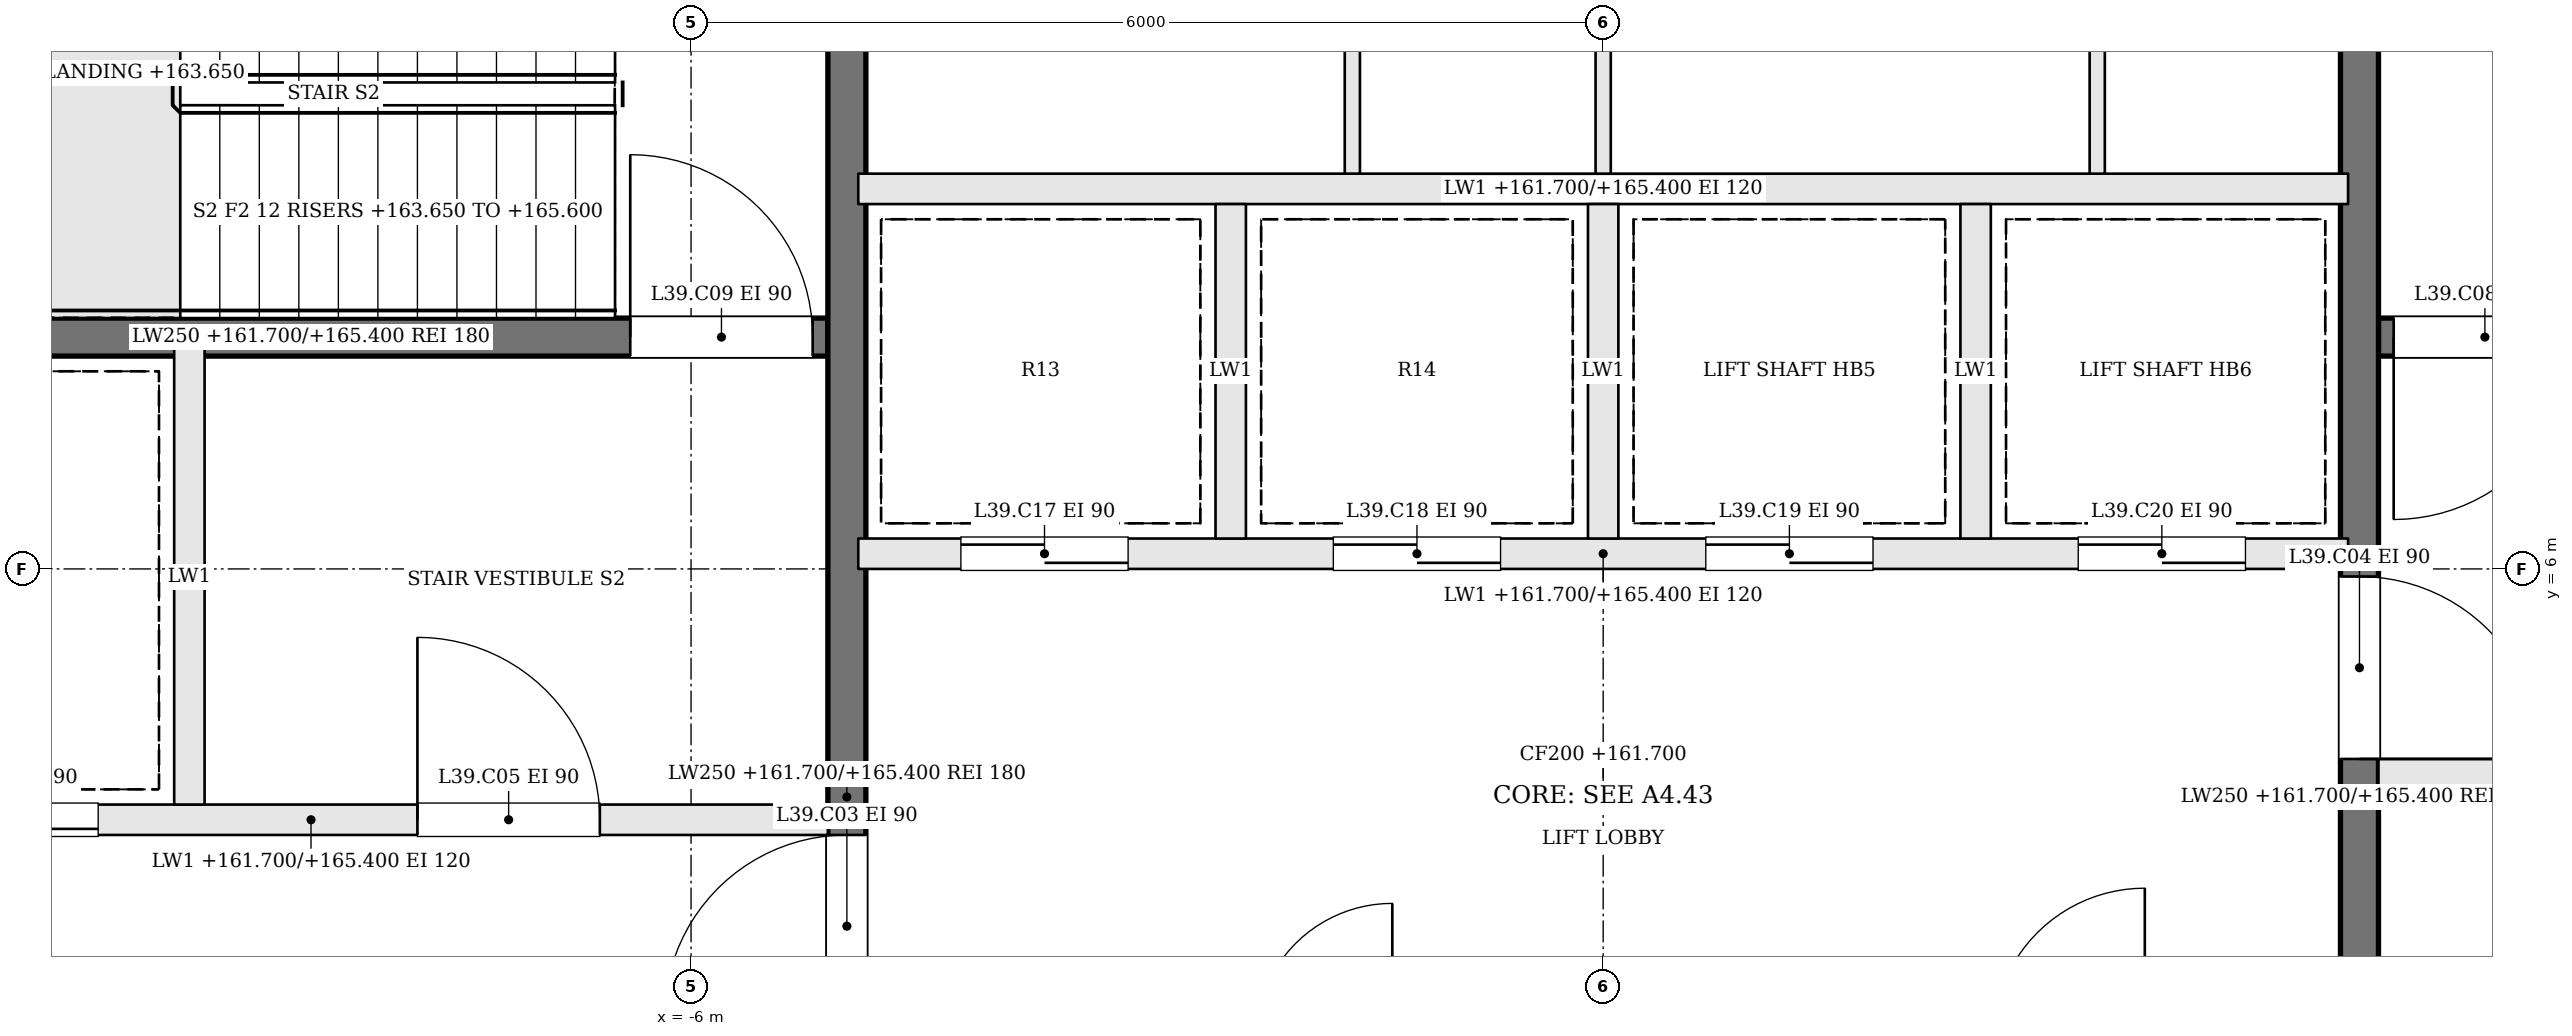
"""IFC4 building model, lengths in metres.
Left out: names, types, materials, properties, quantities, classifications, styles, units other than length and angle.
Written with IfcOpenShell. Run it as: python <this file> out.ifc"""

import sys

from ifc_helpers import new_model, si_unit, direction, frame, frame_2d, origin, place, context, subcontext, project, spatial, rectangle, extrude, element, fill, save


model = new_model("IFC4")
c1 = context("Model", 3, precision=1e-05, world=origin(), true_north=direction((0.0, 1.0)))
c2 = subcontext(c1, "Body", "Model", "MODEL_VIEW")
j1 = project(units=[si_unit("LENGTHUNIT", "METRE"), si_unit("PLANEANGLEUNIT", "RADIAN")], contexts=[c1])
p1 = place(None, origin())
s1 = spatial("IfcSite", under=j1, at=p1, CompositionType="ELEMENT")
p2 = place(p1, origin())
s2 = spatial("IfcBuilding", under=s1, at=p2, CompositionType="ELEMENT")
p3 = place(p2, frame((0.0, 0.0, 161.7)))
s3 = spatial("IfcBuildingStorey", under=s2, at=p3, CompositionType="ELEMENT", Elevation=161.7)
p4 = place(p3, frame((11.9, 7.525, 0.0), z_axis=(0.0, 0.0, 1.0), x_axis=(-1.0, 0.0, 0.0)))
e1 = element("IfcWall", 1, at=p4, inside=s3, PredefinedType="SOLIDWALL", context=c2, shape_type="SweptSolid", body=[
    extrude(rectangle(XDim=6.8, YDim=0.25, at=frame_2d((3.4, 0.0))), origin(), (0.0, 0.0, 1.0), 3.7),
])
p5 = place(p4, frame((5.5, 0.0, 0.0)))
e2 = element("IfcOpeningElement", 2, at=p5, cuts=e1, PredefinedType="OPENING", context=c2, shape_type="SweptSolid", body=[
    extrude(rectangle(XDim=1.2, YDim=2.1, at=frame_2d((0.6, 1.05))), frame((0.0, 0.135, 0.0), z_axis=(0.0, -1.0, 0.0), x_axis=(1.0, 0.0, 0.0)), (0.0, 0.0, 1.0), 0.27),
])
p6 = place(p3, frame((-11.9, 4.35, 0.0), z_axis=(0.0, 0.0, 1.0), x_axis=(1.0, 0.0, 0.0)))
e3 = element("IfcWall", 3, at=p6, inside=s3, PredefinedType="SOLIDWALL", context=c2, shape_type="SweptSolid", body=[
    extrude(rectangle(XDim=6.8, YDim=0.2, at=frame_2d((3.4, 0.0))), origin(), (0.0, 0.0, 1.0), 3.7),
])
p7 = place(p6, frame((4.1, 0.0, 0.0)))
e4 = element("IfcOpeningElement", 4, at=p7, cuts=e3, PredefinedType="OPENING", context=c2, shape_type="SweptSolid", body=[
    extrude(rectangle(XDim=1.2, YDim=2.1, at=frame_2d((0.6, 1.05))), frame((0.0, 0.11, 0.0), z_axis=(0.0, -1.0, 0.0), x_axis=(1.0, 0.0, 0.0)), (0.0, 0.0, 1.0), 0.22),
])
p8 = place(p6, frame((0.8, 0.0, 0.0)))
e5 = element("IfcOpeningElement", 5, at=p8, cuts=e3, PredefinedType="OPENING", context=c2, shape_type="SweptSolid", body=[
    extrude(rectangle(XDim=1.2, YDim=2.1, at=frame_2d((0.6, 1.05))), frame((0.0, 0.11, 0.0), z_axis=(0.0, -1.0, 0.0), x_axis=(1.0, 0.0, 0.0)), (0.0, 0.0, 1.0), 0.22),
])
p9 = place(p3, frame((11.9, 4.65, 0.0), z_axis=(0.0, 0.0, 1.0), x_axis=(-1.0, 0.0, 0.0)))
e6 = element("IfcWall", 6, at=p9, inside=s3, PredefinedType="SOLIDWALL", context=c2, shape_type="SweptSolid", body=[
    extrude(rectangle(XDim=6.8, YDim=0.2, at=frame_2d((3.4, 0.0))), origin(), (0.0, 0.0, 1.0), 3.7),
])
p10 = place(p9, frame((4.1, 0.0, 0.0)))
e7 = element("IfcOpeningElement", 7, at=p10, cuts=e6, PredefinedType="OPENING", context=c2, shape_type="SweptSolid", body=[
    extrude(rectangle(XDim=1.2, YDim=2.1, at=frame_2d((0.6, 1.05))), frame((0.0, 0.11, 0.0), z_axis=(0.0, -1.0, 0.0), x_axis=(1.0, 0.0, 0.0)), (0.0, 0.0, 1.0), 0.22),
])
p11 = place(p9, frame((0.8, 0.0, 0.0)))
e8 = element("IfcOpeningElement", 8, at=p11, cuts=e6, PredefinedType="OPENING", context=c2, shape_type="SweptSolid", body=[
    extrude(rectangle(XDim=1.2, YDim=2.1, at=frame_2d((0.6, 1.05))), frame((0.0, 0.11, 0.0), z_axis=(0.0, -1.0, 0.0), x_axis=(1.0, 0.0, 0.0)), (0.0, 0.0, 1.0), 0.22),
])
p12 = place(p3, frame((-11.9, 7.525, 0.0), z_axis=(0.0, 0.0, 1.0), x_axis=(1.0, 0.0, 0.0)))
e9 = element("IfcWall", 9, at=p12, inside=s3, PredefinedType="SOLIDWALL", context=c2, shape_type="SweptSolid", body=[
    extrude(rectangle(XDim=6.8, YDim=0.25, at=frame_2d((3.4, 0.0))), origin(), (0.0, 0.0, 1.0), 3.7),
])
p13 = place(p12, frame((5.5, 0.0, 0.0)))
e10 = element("IfcOpeningElement", 10, at=p13, cuts=e9, PredefinedType="OPENING", context=c2, shape_type="SweptSolid", body=[
    extrude(rectangle(XDim=1.2, YDim=2.1, at=frame_2d((0.6, 1.05))), frame((0.0, 0.135, 0.0), z_axis=(0.0, -1.0, 0.0), x_axis=(1.0, 0.0, 0.0)), (0.0, 0.0, 1.0), 0.27),
])
p14 = place(p3, frame((-9.3, 4.45, 0.0), z_axis=(0.0, 0.0, 1.0), x_axis=(0.0, 1.0, 0.0)))
e11 = element("IfcWall", 11, at=p14, inside=s3, PredefinedType="SOLIDWALL", context=c2, shape_type="SweptSolid", body=[
    extrude(rectangle(XDim=3.0, YDim=0.2, at=frame_2d((1.5, 0.0))), origin(), (0.0, 0.0, 1.0), 3.7),
])
p15 = place(p3, frame((-4.975, -1.9, 0.0), z_axis=(0.0, 0.0, 1.0), x_axis=(0.0, 1.0, 0.0)))
e12 = element("IfcWall", 12, at=p15, inside=s3, PredefinedType="SOLIDWALL", context=c2, shape_type="SweptSolid", body=[
    extrude(rectangle(XDim=12.8, YDim=0.25, at=frame_2d((6.4, 0.0))), origin(), (0.0, 0.0, 1.0), 3.7),
])
p16 = place(p15, frame((4.95, 0.0, 0.0)))
e13 = element("IfcOpeningElement", 13, at=p16, cuts=e12, PredefinedType="OPENING", context=c2, shape_type="SweptSolid", body=[
    extrude(rectangle(XDim=1.2, YDim=2.1, at=frame_2d((0.6, 1.05))), frame((0.0, 0.135, 0.0), z_axis=(0.0, -1.0, 0.0), x_axis=(1.0, 0.0, 0.0)), (0.0, 0.0, 1.0), 0.27),
])
p17 = place(p3, frame((4.975, 10.9, 0.0), z_axis=(0.0, 0.0, 1.0), x_axis=(0.0, -1.0, 0.0)))
e14 = element("IfcWall", 14, at=p17, inside=s3, PredefinedType="SOLIDWALL", context=c2, shape_type="SweptSolid", body=[
    extrude(rectangle(XDim=12.8, YDim=0.25, at=frame_2d((6.4, 0.0))), origin(), (0.0, 0.0, 1.0), 3.7),
])
p18 = place(p17, frame((4.95, 0.0, 0.0)))
e15 = element("IfcOpeningElement", 15, at=p18, cuts=e14, PredefinedType="OPENING", context=c2, shape_type="SweptSolid", body=[
    extrude(rectangle(XDim=1.2, YDim=2.1, at=frame_2d((0.6, 1.05))), frame((0.0, 0.135, 0.0), z_axis=(0.0, -1.0, 0.0), x_axis=(1.0, 0.0, 0.0)), (0.0, 0.0, 1.0), 0.27),
])
p19 = place(p3, frame((-4.9, 6.1, 0.0), z_axis=(0.0, 0.0, 1.0), x_axis=(1.0, 0.0, 0.0)))
e16 = element("IfcWall", 16, at=p19, inside=s3, PredefinedType="SOLIDWALL", context=c2, shape_type="SweptSolid", body=[
    extrude(rectangle(XDim=9.8, YDim=0.2, at=frame_2d((4.9, 0.0))), origin(), (0.0, 0.0, 1.0), 3.7),
])
p20 = place(p19, frame((0.675, 0.0, 0.0)))
e17 = element("IfcOpeningElement", 17, at=p20, cuts=e16, PredefinedType="OPENING", context=c2, shape_type="SweptSolid", body=[
    extrude(rectangle(XDim=1.1, YDim=2.1, at=frame_2d((0.55, 1.05))), frame((0.0, 0.11, 0.0), z_axis=(0.0, -1.0, 0.0), x_axis=(1.0, 0.0, 0.0)), (0.0, 0.0, 1.0), 0.22),
])
p21 = place(p19, frame((3.125, 0.0, 0.0)))
e18 = element("IfcOpeningElement", 18, at=p21, cuts=e16, PredefinedType="OPENING", context=c2, shape_type="SweptSolid", body=[
    extrude(rectangle(XDim=1.1, YDim=2.1, at=frame_2d((0.55, 1.05))), frame((0.0, 0.11, 0.0), z_axis=(0.0, -1.0, 0.0), x_axis=(1.0, 0.0, 0.0)), (0.0, 0.0, 1.0), 0.22),
])
p22 = place(p19, frame((5.575, 0.0, 0.0)))
e19 = element("IfcOpeningElement", 19, at=p22, cuts=e16, PredefinedType="OPENING", context=c2, shape_type="SweptSolid", body=[
    extrude(rectangle(XDim=1.1, YDim=2.1, at=frame_2d((0.55, 1.05))), frame((0.0, 0.11, 0.0), z_axis=(0.0, -1.0, 0.0), x_axis=(1.0, 0.0, 0.0)), (0.0, 0.0, 1.0), 0.22),
])
p23 = place(p19, frame((8.025, 0.0, 0.0)))
e20 = element("IfcOpeningElement", 20, at=p23, cuts=e16, PredefinedType="OPENING", context=c2, shape_type="SweptSolid", body=[
    extrude(rectangle(XDim=1.1, YDim=2.1, at=frame_2d((0.55, 1.05))), frame((0.0, 0.11, 0.0), z_axis=(0.0, -1.0, 0.0), x_axis=(1.0, 0.0, 0.0)), (0.0, 0.0, 1.0), 0.22),
])
p24 = place(p3, frame((-4.9, 8.5, 0.0), z_axis=(0.0, 0.0, 1.0), x_axis=(1.0, 0.0, 0.0)))
e21 = element("IfcWall", 21, at=p24, inside=s3, PredefinedType="SOLIDWALL", context=c2, shape_type="SweptSolid", body=[
    extrude(rectangle(XDim=9.8, YDim=0.2, at=frame_2d((4.9, 0.0))), origin(), (0.0, 0.0, 1.0), 3.7),
])
for number, where, z_axis, x_axis in (
    (22, (-2.45, 6.2, 0.0), (0.0, 0.0, 1.0), (0.0, 1.0, 0.0)),
    (23, (0.0, 6.2, 0.0), (0.0, 0.0, 1.0), (0.0, 1.0, 0.0)),
    (24, (2.45, 6.2, 0.0), (0.0, 0.0, 1.0), (0.0, 1.0, 0.0)),
):
    element("IfcWall", number, at=place(p3, frame(where, z_axis=z_axis, x_axis=x_axis)), inside=s3, PredefinedType="SOLIDWALL", context=c2, shape_type="SweptSolid", body=[
        extrude(rectangle(XDim=2.2, YDim=0.2, at=frame_2d((1.1, 0.0))), origin(), (0.0, 0.0, 1.0), 3.7),
    ])
for number, where, z_axis, x_axis in (
    (25, (-1.65, 8.6, 0.0), (0.0, 0.0, 1.0), (0.0, 1.0, 0.0)),
    (26, (0.0, 8.6, 0.0), (0.0, 0.0, 1.0), (0.0, 1.0, 0.0)),
    (27, (3.25, 8.6, 0.0), (0.0, 0.0, 1.0), (0.0, 1.0, 0.0)),
):
    element("IfcWall", number, at=place(p3, frame(where, z_axis=z_axis, x_axis=x_axis)), inside=s3, PredefinedType="PARTITIONING", context=c2, shape_type="SweptSolid", body=[
        extrude(rectangle(XDim=2.3, YDim=0.1, at=frame_2d((1.15, 0.0))), origin(), (0.0, 0.0, 1.0), 3.7),
    ])
p25 = place(p16, origin())
e28 = element("IfcDoor", 28, at=p25, inside=s3, OperationType="SINGLE_SWING_LEFT", PredefinedType="DOOR", context=c2, shape_type="SweptSolid", body=[
    extrude(rectangle(XDim=1.2, YDim=2.1, at=frame_2d((0.6, 1.05))), frame((0.0, 0.025, 0.0), z_axis=(0.0, -1.0, 0.0), x_axis=(1.0, 0.0, 0.0)), (0.0, 0.0, 1.0), 0.05),
])
fill(e13, e28)
p26 = place(p18, origin())
e29 = element("IfcDoor", 29, at=p26, inside=s3, OperationType="SINGLE_SWING_RIGHT", PredefinedType="DOOR", context=c2, shape_type="SweptSolid", body=[
    extrude(rectangle(XDim=1.2, YDim=2.1, at=frame_2d((0.6, 1.05))), frame((0.0, 0.025, 0.0), z_axis=(0.0, -1.0, 0.0), x_axis=(1.0, 0.0, 0.0)), (0.0, 0.0, 1.0), 0.05),
])
fill(e15, e29)
p27 = place(p7, origin())
e30 = element("IfcDoor", 30, at=p27, inside=s3, OperationType="SINGLE_SWING_LEFT", PredefinedType="DOOR", context=c2, shape_type="SweptSolid", body=[
    extrude(rectangle(XDim=1.2, YDim=2.1, at=frame_2d((0.6, 1.05))), frame((0.0, 0.025, 0.0), z_axis=(0.0, -1.0, 0.0), x_axis=(1.0, 0.0, 0.0)), (0.0, 0.0, 1.0), 0.05),
])
fill(e4, e30)
p28 = place(p5, origin())
e31 = element("IfcDoor", 31, at=p28, inside=s3, OperationType="SINGLE_SWING_RIGHT", PredefinedType="DOOR", context=c2, shape_type="SweptSolid", body=[
    extrude(rectangle(XDim=1.2, YDim=2.1, at=frame_2d((0.6, 1.05))), frame((0.0, 0.025, 0.0), z_axis=(0.0, -1.0, 0.0), x_axis=(1.0, 0.0, 0.0)), (0.0, 0.0, 1.0), 0.05),
])
fill(e2, e31)
p29 = place(p13, origin())
e32 = element("IfcDoor", 32, at=p29, inside=s3, OperationType="SINGLE_SWING_LEFT", PredefinedType="DOOR", context=c2, shape_type="SweptSolid", body=[
    extrude(rectangle(XDim=1.2, YDim=2.1, at=frame_2d((0.6, 1.05))), frame((0.0, 0.025, 0.0), z_axis=(0.0, -1.0, 0.0), x_axis=(1.0, 0.0, 0.0)), (0.0, 0.0, 1.0), 0.05),
])
fill(e10, e32)
p30 = place(p8, origin())
e33 = element("IfcDoor", 33, at=p30, inside=s3, OperationType="SLIDING_TO_RIGHT", PredefinedType="DOOR", context=c2, shape_type="SweptSolid", body=[
    extrude(rectangle(XDim=1.2, YDim=2.1, at=frame_2d((0.6, 1.05))), frame((0.0, 0.025, 0.0), z_axis=(0.0, -1.0, 0.0), x_axis=(1.0, 0.0, 0.0)), (0.0, 0.0, 1.0), 0.05),
])
fill(e5, e33)
p31 = place(p20, origin())
e34 = element("IfcDoor", 34, at=p31, inside=s3, OperationType="SLIDING_TO_RIGHT", PredefinedType="DOOR", context=c2, shape_type="SweptSolid", body=[
    extrude(rectangle(XDim=1.1, YDim=2.1, at=frame_2d((0.55, 1.05))), frame((0.0, 0.025, 0.0), z_axis=(0.0, -1.0, 0.0), x_axis=(1.0, 0.0, 0.0)), (0.0, 0.0, 1.0), 0.05),
])
fill(e17, e34)
p32 = place(p21, origin())
e35 = element("IfcDoor", 35, at=p32, inside=s3, OperationType="SLIDING_TO_LEFT", PredefinedType="DOOR", context=c2, shape_type="SweptSolid", body=[
    extrude(rectangle(XDim=1.1, YDim=2.1, at=frame_2d((0.55, 1.05))), frame((0.0, 0.025, 0.0), z_axis=(0.0, -1.0, 0.0), x_axis=(1.0, 0.0, 0.0)), (0.0, 0.0, 1.0), 0.05),
])
fill(e18, e35)
p33 = place(p22, origin())
e36 = element("IfcDoor", 36, at=p33, inside=s3, OperationType="SLIDING_TO_RIGHT", PredefinedType="DOOR", context=c2, shape_type="SweptSolid", body=[
    extrude(rectangle(XDim=1.1, YDim=2.1, at=frame_2d((0.55, 1.05))), frame((0.0, 0.025, 0.0), z_axis=(0.0, -1.0, 0.0), x_axis=(1.0, 0.0, 0.0)), (0.0, 0.0, 1.0), 0.05),
])
fill(e19, e36)
p34 = place(p23, origin())
e37 = element("IfcDoor", 37, at=p34, inside=s3, OperationType="SLIDING_TO_LEFT", PredefinedType="DOOR", context=c2, shape_type="SweptSolid", body=[
    extrude(rectangle(XDim=1.1, YDim=2.1, at=frame_2d((0.55, 1.05))), frame((0.0, 0.025, 0.0), z_axis=(0.0, -1.0, 0.0), x_axis=(1.0, 0.0, 0.0)), (0.0, 0.0, 1.0), 0.05),
])
fill(e20, e37)
save(model, sys.argv[1])
